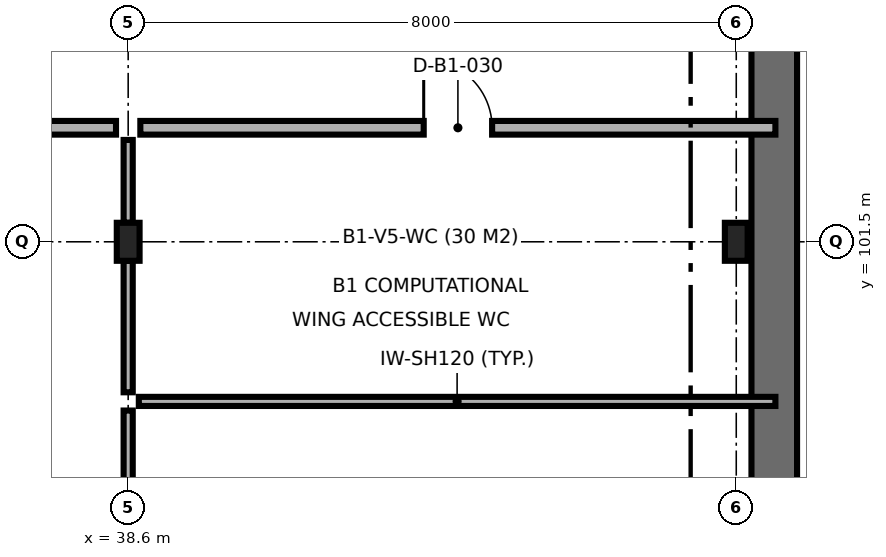
"""IFC4 building model, lengths in metres.
Left out: names, types, materials, properties, quantities, classifications, styles, units other than length and angle.
Written with IfcOpenShell. Run it as: python <this file> out.ifc"""

import sys

from ifc_helpers import new_model, si_unit, direction, frame, frame_2d, origin, origin_2d, place, context, subcontext, project, spatial, rectangle, i_section, extrude, element, fill, save


model = new_model("IFC4")
c1 = context("Model", 3, precision=1e-05, world=origin(), true_north=direction((0.0, 1.0)))
c2 = subcontext(c1, "Body", "Model", "MODEL_VIEW")
j1 = project(units=[si_unit("LENGTHUNIT", "METRE"), si_unit("PLANEANGLEUNIT", "RADIAN")], contexts=[c1])
p1 = place(None, origin())
s1 = spatial("IfcSite", under=j1, at=p1, CompositionType="ELEMENT")
p2 = place(p1, origin())
s2 = spatial("IfcBuilding", under=s1, at=p2, CompositionType="ELEMENT")
p3 = place(p2, frame((0.0, 0.0, -5.0)))
s3 = spatial("IfcBuildingStorey", under=s2, at=p3, CompositionType="ELEMENT", Elevation=-5.0)
for number, where, z_axis, x_axis in (
    (1, (38.6, 101.5, 0.0), (0.0, 0.0, 1.0), (1.0, 0.0, 0.0)),
    (2, (46.6, 101.5, 0.0), (0.0, 0.0, 1.0), (1.0, 0.0, 0.0)),
):
    element("IfcColumn", number, at=place(p3, frame(where, z_axis=z_axis, x_axis=x_axis)), inside=s3, PredefinedType="COLUMN", context=c2, shape_type="SweptSolid", body=[
        extrude(i_section(OverallWidth=0.3, OverallDepth=0.5, WebThickness=0.014, FlangeThickness=0.028, FilletRadius=0.027, at=origin_2d()), origin(), (0.0, 0.0, 1.0), 5.0),
    ])
p4 = place(p3, frame((47.1, 88.73, 0.0), z_axis=(0.0, 0.0, 1.0), x_axis=(0.0, 1.0, 0.0)))
e3 = element("IfcWall", 3, at=p4, inside=s3, PredefinedType="SHEAR", context=c2, shape_type="SweptSolid", body=[
    extrude(rectangle(XDim=27.37, YDim=0.6, at=frame_2d((13.685, 0.0))), origin(), (0.0, 0.0, 1.0), 4.7),
])
p5 = place(p3, frame((38.74, 99.4, 0.0), z_axis=(0.0, 0.0, 1.0), x_axis=(1.0, 0.0, 0.0)))
e4 = element("IfcWall", 4, at=p5, inside=s3, PredefinedType="PARTITIONING", context=c2, shape_type="SweptSolid", body=[
    extrude(rectangle(XDim=8.375, YDim=0.12, at=frame_2d((4.188, 0.0))), origin(), (0.0, 0.0, 1.0), 4.7),
])
p6 = place(p3, frame((38.6, 93.75, 0.0), z_axis=(0.0, 0.0, 1.0), x_axis=(0.0, 1.0, 0.0)))
e5 = element("IfcWall", 5, at=p6, inside=s3, PredefinedType="PARTITIONING", context=c2, shape_type="SweptSolid", body=[
    extrude(rectangle(XDim=5.53, YDim=0.12, at=frame_2d((2.765, 0.0))), origin(), (0.0, 0.0, 1.0), 4.2),
])
p7 = place(p3, frame((38.6, 99.52, 0.0), z_axis=(0.0, 0.0, 1.0), x_axis=(0.0, 1.0, 0.0)))
e6 = element("IfcWall", 6, at=p7, inside=s3, PredefinedType="PARTITIONING", context=c2, shape_type="SweptSolid", body=[
    extrude(rectangle(XDim=1.73, YDim=0.12, at=frame_2d((0.865, 0.0))), origin(), (0.0, 0.0, 1.0), 4.2),
])
p8 = place(p3, frame((38.6, 101.75, 0.0), z_axis=(0.0, 0.0, 1.0), x_axis=(0.0, 1.0, 0.0)))
e7 = element("IfcWall", 7, at=p8, inside=s3, PredefinedType="PARTITIONING", context=c2, shape_type="SweptSolid", body=[
    extrude(rectangle(XDim=1.09, YDim=0.12, at=frame_2d((0.545, 0.0))), origin(), (0.0, 0.0, 1.0), 4.2),
])
p9 = place(p3, frame((27.76, 103.0, 0.0), z_axis=(0.0, 0.0, 1.0), x_axis=(1.0, 0.0, 0.0)))
e8 = element("IfcWall", 8, at=p9, inside=s3, PredefinedType="PARTITIONING", context=c2, shape_type="SweptSolid", body=[
    extrude(rectangle(XDim=10.68, YDim=0.18, at=frame_2d((5.34, 0.0))), origin(), (0.0, 0.0, 1.0), 4.7),
])
p10 = place(p9, frame((4.79, 0.0, 0.0)))
e9 = element("IfcOpeningElement", 9, at=p10, cuts=e8, PredefinedType="OPENING", context=c2, shape_type="SweptSolid", body=[
    extrude(rectangle(XDim=1.1, YDim=2.15, at=frame_2d((0.55, 1.075))), frame((0.0, 0.1, 0.0), z_axis=(0.0, -1.0, 0.0), x_axis=(1.0, 0.0, 0.0)), (0.0, 0.0, 1.0), 0.2),
])
p11 = place(p3, frame((38.76, 103.0, 0.0), z_axis=(0.0, 0.0, 1.0), x_axis=(1.0, 0.0, 0.0)))
e10 = element("IfcWall", 10, at=p11, inside=s3, PredefinedType="PARTITIONING", context=c2, shape_type="SweptSolid", body=[
    extrude(rectangle(XDim=8.355, YDim=0.18, at=frame_2d((4.177, 0.0))), origin(), (0.0, 0.0, 1.0), 4.7),
])
p12 = place(p11, frame((3.728, 0.0, 0.0)))
e11 = element("IfcOpeningElement", 11, at=p12, cuts=e10, PredefinedType="OPENING", context=c2, shape_type="SweptSolid", body=[
    extrude(rectangle(XDim=0.9, YDim=2.1, at=frame_2d((0.45, 1.05))), frame((0.0, 0.1, 0.0), z_axis=(0.0, -1.0, 0.0), x_axis=(1.0, 0.0, 0.0)), (0.0, 0.0, 1.0), 0.2),
])
p13 = place(p12, origin())
e12 = element("IfcDoor", 12, at=p13, inside=s3, OperationType="SINGLE_SWING_LEFT", PredefinedType="DOOR", context=c2, shape_type="SweptSolid", body=[
    extrude(rectangle(XDim=0.9, YDim=2.1, at=frame_2d((0.45, 1.05))), frame((0.0, 0.025, 0.0), z_axis=(0.0, -1.0, 0.0), x_axis=(1.0, 0.0, 0.0)), (0.0, 0.0, 1.0), 0.05),
])
fill(e11, e12)
save(model, sys.argv[1])
